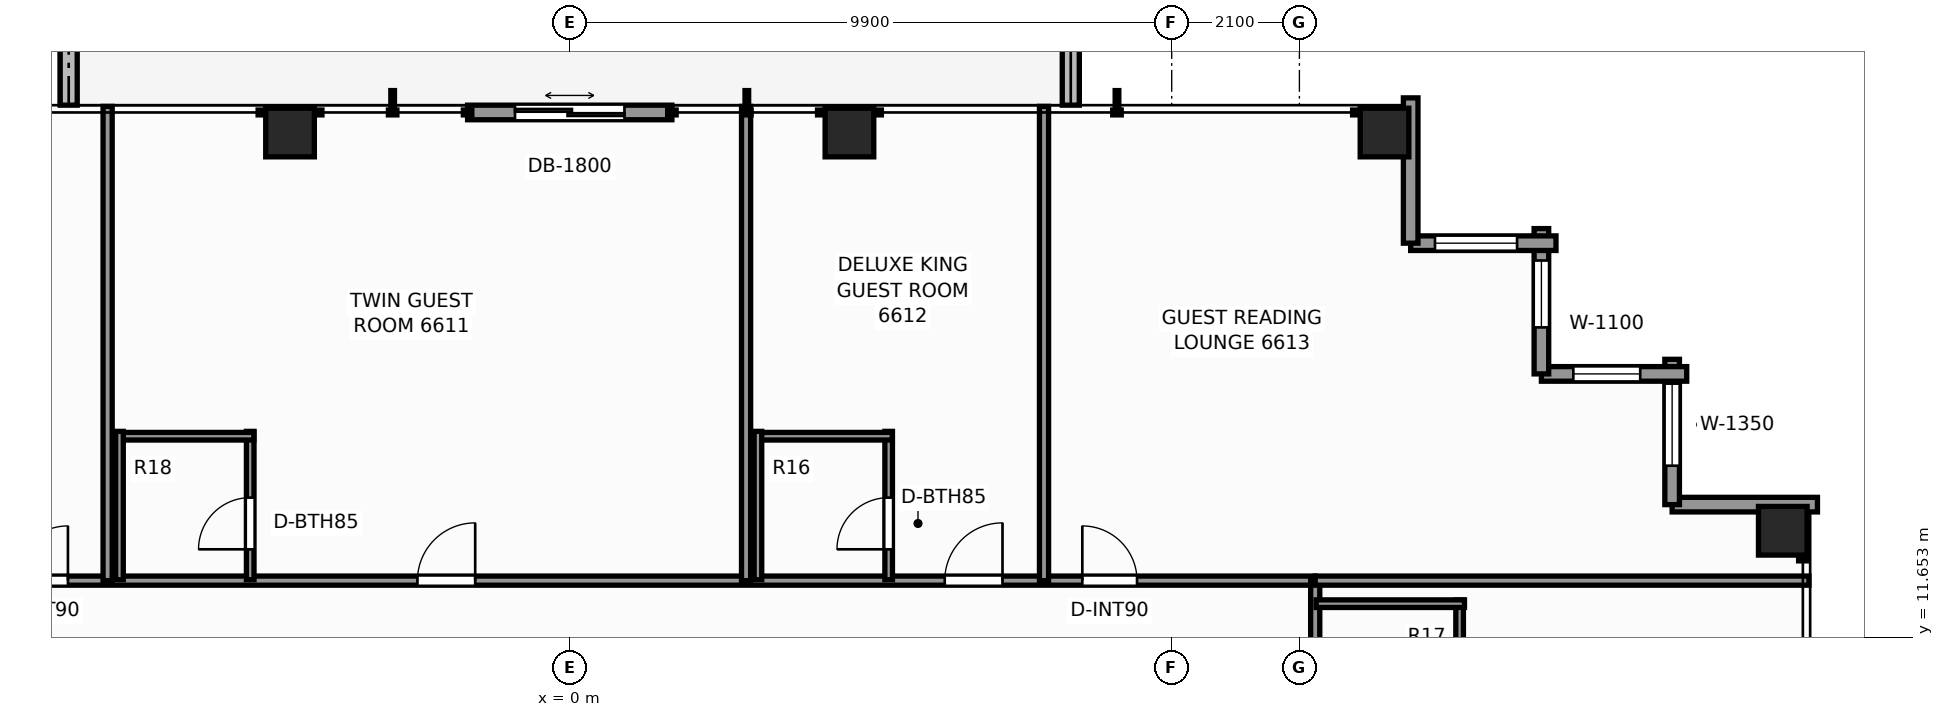
"""IFC4 building model, lengths in metres.
Left out: names, types, materials, properties, quantities, classifications, styles, units other than length and angle.
Written with IfcOpenShell. Run it as: python <this file> out.ifc"""

import sys

from ifc_helpers import new_model, si_unit, direction, frame, frame_2d, origin, origin_2d, place, context, subcontext, project, spatial, rectangle, extrude, element, fill, save


model = new_model("IFC4")
c1 = context("Model", 3, precision=1e-05, world=origin(), true_north=direction((0.0, 1.0)))
c2 = subcontext(c1, "Body", "Model", "MODEL_VIEW")
j1 = project(units=[si_unit("LENGTHUNIT", "METRE"), si_unit("PLANEANGLEUNIT", "RADIAN")], contexts=[c1])
p1 = place(None, origin())
s1 = spatial("IfcSite", under=j1, at=p1, CompositionType="ELEMENT")
p2 = place(p1, origin())
s2 = spatial("IfcBuilding", under=s1, at=p2, CompositionType="ELEMENT")
p3 = place(p2, frame((0.0, 0.0, 226.2)))
s3 = spatial("IfcBuildingStorey", under=s2, at=p3, CompositionType="ELEMENT", Elevation=226.2)
for number, where, z_axis, x_axis in (
    (1, (-4.6, 19.95, 0.0), (0.0, 0.0, 1.0), (1.0, 0.0, 0.0)),
    (2, (4.6, 19.95, 0.0), (0.0, 0.0, 1.0), (1.0, 0.0, 0.0)),
    (3, (13.4, 19.95, 0.0), (0.0, 0.0, 1.0), (1.0, 0.0, 0.0)),
    (4, (19.95, 13.4, 0.0), (0.0, 0.0, 1.0), (1.0, 0.0, 0.0)),
):
    element("IfcColumn", number, at=place(p3, frame(where, z_axis=z_axis, x_axis=x_axis)), inside=s3, PredefinedType="COLUMN", context=c2, shape_type="SweptSolid", body=[
        extrude(rectangle(XDim=0.8, YDim=0.8, at=origin_2d()), origin(), (0.0, 0.0, 1.0), 3.3),
    ])
p4 = place(p3, frame((8.24, 20.4, -0.04), z_axis=(0.0, 0.0, 1.0), x_axis=(0.0, 1.0, 0.0)))
e5 = element("IfcWall", 5, at=p4, inside=s3, PredefinedType="PARAPET", context=c2, shape_type="SweptSolid", body=[
    extrude(rectangle(XDim=2.34, YDim=0.28, at=frame_2d((1.17, 0.0))), origin(), (0.0, 0.0, 1.0), 0.42),
])
p5 = place(p3, frame((-8.24, 23.767, -0.04), z_axis=(0.0, 0.0, 1.0), x_axis=(0.0, -1.0, 0.0)))
e6 = element("IfcWall", 6, at=p5, inside=s3, PredefinedType="PARAPET", context=c2, shape_type="SweptSolid", body=[
    extrude(rectangle(XDim=3.367, YDim=0.28, at=frame_2d((1.684, 0.0))), origin(), (0.0, 0.0, 1.0), 0.42),
])
p6 = place(p3, frame((18.13, 13.83, 0.0), z_axis=(0.0, 0.0, 1.0), x_axis=(1.0, 0.0, 0.0)))
e7 = element("IfcWall", 7, at=p6, inside=s3, PredefinedType="STANDARD", context=c2, shape_type="SweptSolid", body=[
    extrude(rectangle(XDim=2.39, YDim=0.24, at=frame_2d((1.195, 0.0))), origin(), (0.0, 0.0, 1.0), 2.463),
])
p7 = place(p3, frame((18.13, 16.22, 0.0), z_axis=(0.0, 0.0, 1.0), x_axis=(0.0, -1.0, 0.0)))
e8 = element("IfcWall", 8, at=p7, inside=s3, PredefinedType="STANDARD", context=c2, shape_type="SweptSolid", body=[
    extrude(rectangle(XDim=2.39, YDim=0.24, at=frame_2d((1.195, 0.0))), origin(), (0.0, 0.0, 1.0), 2.463),
])
p8 = place(p7, frame((0.4, 0.0, 0.65)))
e9 = element("IfcOpeningElement", 9, at=p8, cuts=e8, PredefinedType="OPENING", context=c2, shape_type="SweptSolid", body=[
    extrude(rectangle(XDim=1.35, YDim=1.55, at=frame_2d((0.675, 0.775))), frame((0.0, 0.13, 0.0), z_axis=(0.0, -1.0, 0.0), x_axis=(1.0, 0.0, 0.0)), (0.0, 0.0, 1.0), 0.26),
])
p9 = place(p3, frame((15.98, 15.98, 0.0), z_axis=(0.0, 0.0, 1.0), x_axis=(1.0, 0.0, 0.0)))
e10 = element("IfcWall", 10, at=p9, inside=s3, PredefinedType="STANDARD", context=c2, shape_type="SweptSolid", body=[
    extrude(rectangle(XDim=2.39, YDim=0.24, at=frame_2d((1.195, 0.0))), origin(), (0.0, 0.0, 1.0), 2.463),
])
p10 = place(p9, frame((0.525, 0.0, 0.65)))
e11 = element("IfcOpeningElement", 11, at=p10, cuts=e10, PredefinedType="OPENING", context=c2, shape_type="SweptSolid", body=[
    extrude(rectangle(XDim=1.1, YDim=1.45, at=frame_2d((0.55, 0.725))), frame((0.0, 0.13, 0.0), z_axis=(0.0, -1.0, 0.0), x_axis=(1.0, 0.0, 0.0)), (0.0, 0.0, 1.0), 0.26),
])
p11 = place(p3, frame((15.98, 18.37, 0.0), z_axis=(0.0, 0.0, 1.0), x_axis=(0.0, -1.0, 0.0)))
e12 = element("IfcWall", 12, at=p11, inside=s3, PredefinedType="STANDARD", context=c2, shape_type="SweptSolid", body=[
    extrude(rectangle(XDim=2.39, YDim=0.24, at=frame_2d((1.195, 0.0))), origin(), (0.0, 0.0, 1.0), 2.463),
])
p12 = place(p11, frame((0.525, 0.0, 0.65)))
e13 = element("IfcOpeningElement", 13, at=p12, cuts=e12, PredefinedType="OPENING", context=c2, shape_type="SweptSolid", body=[
    extrude(rectangle(XDim=1.1, YDim=1.45, at=frame_2d((0.55, 0.725))), frame((0.0, 0.13, 0.0), z_axis=(0.0, -1.0, 0.0), x_axis=(1.0, 0.0, 0.0)), (0.0, 0.0, 1.0), 0.26),
])
p13 = place(p3, frame((13.83, 18.13, 0.0), z_axis=(0.0, 0.0, 1.0), x_axis=(1.0, 0.0, 0.0)))
e14 = element("IfcWall", 14, at=p13, inside=s3, PredefinedType="STANDARD", context=c2, shape_type="SweptSolid", body=[
    extrude(rectangle(XDim=2.39, YDim=0.24, at=frame_2d((1.195, 0.0))), origin(), (0.0, 0.0, 1.0), 2.463),
])
p14 = place(p13, frame((0.4, 0.0, 0.65)))
e15 = element("IfcOpeningElement", 15, at=p14, cuts=e14, PredefinedType="OPENING", context=c2, shape_type="SweptSolid", body=[
    extrude(rectangle(XDim=1.35, YDim=1.55, at=frame_2d((0.675, 0.775))), frame((0.0, 0.13, 0.0), z_axis=(0.0, -1.0, 0.0), x_axis=(1.0, 0.0, 0.0)), (0.0, 0.0, 1.0), 0.26),
])
p15 = place(p3, frame((13.83, 20.52, 0.0), z_axis=(0.0, 0.0, 1.0), x_axis=(0.0, -1.0, 0.0)))
e16 = element("IfcWall", 16, at=p15, inside=s3, PredefinedType="STANDARD", context=c2, shape_type="SweptSolid", body=[
    extrude(rectangle(XDim=2.39, YDim=0.24, at=frame_2d((1.195, 0.0))), origin(), (0.0, 0.0, 1.0), 2.463),
])
p16 = place(p3, frame((-1.68, 20.28, 0.0), z_axis=(0.0, 0.0, 1.0), x_axis=(1.0, 0.0, 0.0)))
e17 = element("IfcWall", 17, at=p16, inside=s3, PredefinedType="STANDARD", context=c2, shape_type="SweptSolid", body=[
    extrude(rectangle(XDim=3.36, YDim=0.24, at=frame_2d((1.68, 0.0))), origin(), (0.0, 0.0, 1.0), 3.08),
])
p17 = place(p16, frame((0.78, 0.0, 0.0)))
e18 = element("IfcOpeningElement", 18, at=p17, cuts=e17, PredefinedType="OPENING", context=c2, shape_type="SweptSolid", body=[
    extrude(rectangle(XDim=1.8, YDim=2.2, at=frame_2d((0.9, 1.1))), frame((0.0, 0.13, 0.0), z_axis=(0.0, -1.0, 0.0), x_axis=(1.0, 0.0, 0.0)), (0.0, 0.0, 1.0), 0.26),
])
p18 = place(p3, frame((-12.42, 12.58, 0.0), z_axis=(0.0, 0.0, 1.0), x_axis=(1.0, 0.0, 0.0)))
e19 = element("IfcWall", 19, at=p18, inside=s3, PredefinedType="PARTITIONING", context=c2, shape_type="SweptSolid", body=[
    extrude(rectangle(XDim=24.68, YDim=0.15, at=frame_2d((12.34, 0.0))), origin(), (0.0, 0.0, 1.0), 2.369),
])
p19 = place(p18, frame((3.267, 0.0, 0.0)))
e20 = element("IfcOpeningElement", 20, at=p19, cuts=e19, PredefinedType="OPENING", context=c2, shape_type="SweptSolid", body=[
    extrude(rectangle(XDim=0.9, YDim=2.06, at=frame_2d((0.45, 1.03))), frame((0.0, 0.085, 0.0), z_axis=(0.0, -1.0, 0.0), x_axis=(1.0, 0.0, 0.0)), (0.0, 0.0, 1.0), 0.17),
])
p20 = place(p18, frame((9.915, 0.0, 0.0)))
e21 = element("IfcOpeningElement", 21, at=p20, cuts=e19, PredefinedType="OPENING", context=c2, shape_type="SweptSolid", body=[
    extrude(rectangle(XDim=0.95, YDim=2.06, at=frame_2d((0.475, 1.03))), frame((0.0, 0.085, 0.0), z_axis=(0.0, -1.0, 0.0), x_axis=(1.0, 0.0, 0.0)), (0.0, 0.0, 1.0), 0.17),
])
p21 = place(p18, frame((18.587, 0.0, 0.0)))
e22 = element("IfcOpeningElement", 22, at=p21, cuts=e19, PredefinedType="OPENING", context=c2, shape_type="SweptSolid", body=[
    extrude(rectangle(XDim=0.95, YDim=2.06, at=frame_2d((0.475, 1.03))), frame((0.0, 0.085, 0.0), z_axis=(0.0, -1.0, 0.0), x_axis=(1.0, 0.0, 0.0)), (0.0, 0.0, 1.0), 0.17),
])
p22 = place(p18, frame((20.85, 0.0, 0.0)))
e23 = element("IfcOpeningElement", 23, at=p22, cuts=e19, PredefinedType="OPENING", context=c2, shape_type="SweptSolid", body=[
    extrude(rectangle(XDim=0.9, YDim=2.06, at=frame_2d((0.45, 1.03))), frame((0.0, 0.085, 0.0), z_axis=(0.0, -1.0, 0.0), x_axis=(1.0, 0.0, 0.0)), (0.0, 0.0, 1.0), 0.17),
])
p23 = place(p3, frame((12.26, -12.26, 0.0), z_axis=(0.0, 0.0, 1.0), x_axis=(0.0, 1.0, 0.0)))
e24 = element("IfcWall", 24, at=p23, inside=s3, PredefinedType="PARTITIONING", context=c2, shape_type="SweptSolid", body=[
    extrude(rectangle(XDim=24.84, YDim=0.15, at=frame_2d((12.42, 0.0))), origin(), (0.0, 0.0, 1.0), 2.369),
])
p24 = place(p23, frame((3.581, 0.0, 0.0)))
e25 = element("IfcOpeningElement", 25, at=p24, cuts=e24, PredefinedType="OPENING", context=c2, shape_type="SweptSolid", body=[
    extrude(rectangle(XDim=0.95, YDim=2.06, at=frame_2d((0.475, 1.03))), frame((0.0, 0.085, 0.0), z_axis=(0.0, -1.0, 0.0), x_axis=(1.0, 0.0, 0.0)), (0.0, 0.0, 1.0), 0.17),
])
p25 = place(p23, frame((9.755, 0.0, 0.0)))
e26 = element("IfcOpeningElement", 26, at=p25, cuts=e24, PredefinedType="OPENING", context=c2, shape_type="SweptSolid", body=[
    extrude(rectangle(XDim=0.95, YDim=2.06, at=frame_2d((0.475, 1.03))), frame((0.0, 0.085, 0.0), z_axis=(0.0, -1.0, 0.0), x_axis=(1.0, 0.0, 0.0)), (0.0, 0.0, 1.0), 0.17),
])
p26 = place(p23, frame((19.32, 0.0, 0.0)))
e27 = element("IfcOpeningElement", 27, at=p26, cuts=e24, PredefinedType="OPENING", context=c2, shape_type="SweptSolid", body=[
    extrude(rectangle(XDim=0.95, YDim=2.06, at=frame_2d((0.475, 1.03))), frame((0.0, 0.085, 0.0), z_axis=(0.0, -1.0, 0.0), x_axis=(1.0, 0.0, 0.0)), (0.0, 0.0, 1.0), 0.17),
])
p27 = place(p3, frame((12.26, 12.58, 0.0), z_axis=(0.0, 0.0, 1.0), x_axis=(1.0, 0.0, 0.0)))
e28 = element("IfcWall", 28, at=p27, inside=s3, PredefinedType="PARTITIONING", context=c2, shape_type="SweptSolid", body=[
    extrude(rectangle(XDim=8.12, YDim=0.15, at=frame_2d((4.06, 0.0))), origin(), (0.0, 0.0, 1.0), 2.369),
])
p28 = place(p3, frame((14.635, 9.991, 0.0), z_axis=(0.0, 0.0, 1.0), x_axis=(0.0, 1.0, 0.0)))
e29 = element("IfcWall", 29, at=p28, inside=s3, PredefinedType="PARTITIONING", context=c2, shape_type="SweptSolid", body=[
    extrude(rectangle(XDim=2.27, YDim=0.125, at=frame_2d((1.135, 0.0))), origin(), (0.0, 0.0, 1.0), 2.369),
])
p29 = place(p3, frame((12.275, 12.201, 0.0), z_axis=(0.0, 0.0, 1.0), x_axis=(1.0, 0.0, 0.0)))
e30 = element("IfcWall", 30, at=p29, inside=s3, PredefinedType="PARTITIONING", context=c2, shape_type="SweptSolid", body=[
    extrude(rectangle(XDim=2.44, YDim=0.125, at=frame_2d((1.22, 0.0))), origin(), (0.0, 0.0, 1.0), 3.08),
])
for number, where, z_axis, x_axis in (
    (31, (-7.6, 12.58, 0.0), (0.0, 0.0, 1.0), (0.0, 1.0, 0.0)),
    (32, (2.9, 12.58, 0.0), (0.0, 0.0, 1.0), (0.0, 1.0, 0.0)),
):
    element("IfcWall", number, at=place(p3, frame(where, z_axis=z_axis, x_axis=x_axis)), inside=s3, PredefinedType="PARTITIONING", context=c2, shape_type="SweptSolid", body=[
        extrude(rectangle(XDim=7.8, YDim=0.15, at=frame_2d((3.9, 0.0))), origin(), (0.0, 0.0, 1.0), 2.453),
    ])
p30 = place(p3, frame((-5.255, 12.595, 0.0), z_axis=(0.0, 0.0, 1.0), x_axis=(0.0, 1.0, 0.0)))
e33 = element("IfcWall", 33, at=p30, inside=s3, PredefinedType="PARTITIONING", context=c2, shape_type="SweptSolid", body=[
    extrude(rectangle(XDim=2.44, YDim=0.125, at=frame_2d((1.22, 0.0))), origin(), (0.0, 0.0, 1.0), 3.08),
])
p31 = place(p30, frame((0.5, 0.0, 0.0)))
e34 = element("IfcOpeningElement", 34, at=p31, cuts=e33, PredefinedType="OPENING", context=c2, shape_type="SweptSolid", body=[
    extrude(rectangle(XDim=0.85, YDim=2.03, at=frame_2d((0.425, 1.015))), frame((0.0, 0.073, 0.0), z_axis=(0.0, -1.0, 0.0), x_axis=(1.0, 0.0, 0.0)), (0.0, 0.0, 1.0), 0.145),
])
p32 = place(p3, frame((-7.465, 14.955, 0.0), z_axis=(0.0, 0.0, 1.0), x_axis=(1.0, 0.0, 0.0)))
e35 = element("IfcWall", 35, at=p32, inside=s3, PredefinedType="PARTITIONING", context=c2, shape_type="SweptSolid", body=[
    extrude(rectangle(XDim=2.27, YDim=0.125, at=frame_2d((1.135, 0.0))), origin(), (0.0, 0.0, 1.0), 3.08),
])
p33 = place(p3, frame((-7.405, 12.595, 0.0), z_axis=(0.0, 0.0, 1.0), x_axis=(0.0, 1.0, 0.0)))
e36 = element("IfcWall", 36, at=p33, inside=s3, PredefinedType="PARTITIONING", context=c2, shape_type="SweptSolid", body=[
    extrude(rectangle(XDim=2.44, YDim=0.125, at=frame_2d((1.22, 0.0))), origin(), (0.0, 0.0, 1.0), 3.08),
])
p34 = place(p3, frame((7.8, 12.58, 0.0), z_axis=(0.0, 0.0, 1.0), x_axis=(0.0, 1.0, 0.0)))
e37 = element("IfcWall", 37, at=p34, inside=s3, PredefinedType="PARTITIONING", context=c2, shape_type="SweptSolid", body=[
    extrude(rectangle(XDim=7.8, YDim=0.15, at=frame_2d((3.9, 0.0))), origin(), (0.0, 0.0, 1.0), 2.453),
])
p35 = place(p3, frame((5.245, 12.595, 0.0), z_axis=(0.0, 0.0, 1.0), x_axis=(0.0, 1.0, 0.0)))
e38 = element("IfcWall", 38, at=p35, inside=s3, PredefinedType="PARTITIONING", context=c2, shape_type="SweptSolid", body=[
    extrude(rectangle(XDim=2.44, YDim=0.125, at=frame_2d((1.22, 0.0))), origin(), (0.0, 0.0, 1.0), 3.08),
])
p36 = place(p35, frame((0.5, 0.0, 0.0)))
e39 = element("IfcOpeningElement", 39, at=p36, cuts=e38, PredefinedType="OPENING", context=c2, shape_type="SweptSolid", body=[
    extrude(rectangle(XDim=0.85, YDim=2.03, at=frame_2d((0.425, 1.015))), frame((0.0, 0.073, 0.0), z_axis=(0.0, -1.0, 0.0), x_axis=(1.0, 0.0, 0.0)), (0.0, 0.0, 1.0), 0.145),
])
p37 = place(p3, frame((3.035, 14.955, 0.0), z_axis=(0.0, 0.0, 1.0), x_axis=(1.0, 0.0, 0.0)))
e40 = element("IfcWall", 40, at=p37, inside=s3, PredefinedType="PARTITIONING", context=c2, shape_type="SweptSolid", body=[
    extrude(rectangle(XDim=2.27, YDim=0.125, at=frame_2d((1.135, 0.0))), origin(), (0.0, 0.0, 1.0), 2.369),
])
p38 = place(p3, frame((3.095, 12.595, 0.0), z_axis=(0.0, 0.0, 1.0), x_axis=(0.0, 1.0, 0.0)))
e41 = element("IfcWall", 41, at=p38, inside=s3, PredefinedType="PARTITIONING", context=c2, shape_type="SweptSolid", body=[
    extrude(rectangle(XDim=2.44, YDim=0.125, at=frame_2d((1.22, 0.0))), origin(), (0.0, 0.0, 1.0), 3.08),
])
p39 = place(p8, origin())
e42 = element("IfcWindow", 42, at=p39, inside=s3, PartitioningType="SINGLE_PANEL", PredefinedType="WINDOW", context=c2, shape_type="SweptSolid", body=[
    extrude(rectangle(XDim=1.35, YDim=1.55, at=frame_2d((0.675, 0.775))), frame((0.0, 0.03, 0.0), z_axis=(0.0, -1.0, 0.0), x_axis=(1.0, 0.0, 0.0)), (0.0, 0.0, 1.0), 0.06),
])
fill(e9, e42)
p40 = place(p10, origin())
e43 = element("IfcWindow", 43, at=p40, inside=s3, PartitioningType="SINGLE_PANEL", PredefinedType="WINDOW", context=c2, shape_type="SweptSolid", body=[
    extrude(rectangle(XDim=1.1, YDim=1.45, at=frame_2d((0.55, 0.725))), frame((0.0, 0.03, 0.0), z_axis=(0.0, -1.0, 0.0), x_axis=(1.0, 0.0, 0.0)), (0.0, 0.0, 1.0), 0.06),
])
fill(e11, e43)
p41 = place(p12, origin())
e44 = element("IfcWindow", 44, at=p41, inside=s3, PartitioningType="SINGLE_PANEL", PredefinedType="WINDOW", context=c2, shape_type="SweptSolid", body=[
    extrude(rectangle(XDim=1.1, YDim=1.45, at=frame_2d((0.55, 0.725))), frame((0.0, 0.03, 0.0), z_axis=(0.0, -1.0, 0.0), x_axis=(1.0, 0.0, 0.0)), (0.0, 0.0, 1.0), 0.06),
])
fill(e13, e44)
p42 = place(p14, origin())
e45 = element("IfcWindow", 45, at=p42, inside=s3, PartitioningType="SINGLE_PANEL", PredefinedType="WINDOW", context=c2, shape_type="SweptSolid", body=[
    extrude(rectangle(XDim=1.35, YDim=1.55, at=frame_2d((0.675, 0.775))), frame((0.0, 0.03, 0.0), z_axis=(0.0, -1.0, 0.0), x_axis=(1.0, 0.0, 0.0)), (0.0, 0.0, 1.0), 0.06),
])
fill(e15, e45)
p43 = place(p17, origin())
e46 = element("IfcDoor", 46, at=p43, inside=s3, OperationType="DOUBLE_DOOR_SLIDING", PredefinedType="DOOR", context=c2, shape_type="SweptSolid", body=[
    extrude(rectangle(XDim=1.8, YDim=2.2, at=frame_2d((0.9, 1.1))), frame((0.0, 0.025, 0.0), z_axis=(0.0, -1.0, 0.0), x_axis=(1.0, 0.0, 0.0)), (0.0, 0.0, 1.0), 0.05),
])
fill(e18, e46)
p44 = place(p19, origin())
e47 = element("IfcDoor", 47, at=p44, inside=s3, OperationType="SINGLE_SWING_RIGHT", PredefinedType="DOOR", context=c2, shape_type="SweptSolid", body=[
    extrude(rectangle(XDim=0.9, YDim=2.06, at=frame_2d((0.45, 1.03))), frame((0.0, 0.025, 0.0), z_axis=(0.0, -1.0, 0.0), x_axis=(1.0, 0.0, 0.0)), (0.0, 0.0, 1.0), 0.05),
])
fill(e20, e47)
p45 = place(p31, origin())
e48 = element("IfcDoor", 48, at=p45, inside=s3, OperationType="SINGLE_SWING_LEFT", PredefinedType="DOOR", context=c2, shape_type="SweptSolid", body=[
    extrude(rectangle(XDim=0.85, YDim=2.03, at=frame_2d((0.425, 1.015))), frame((0.0, 0.025, 0.0), z_axis=(0.0, -1.0, 0.0), x_axis=(1.0, 0.0, 0.0)), (0.0, 0.0, 1.0), 0.05),
])
fill(e34, e48)
p46 = place(p20, origin())
e49 = element("IfcDoor", 49, at=p46, inside=s3, OperationType="SINGLE_SWING_RIGHT", PredefinedType="DOOR", context=c2, shape_type="SweptSolid", body=[
    extrude(rectangle(XDim=0.95, YDim=2.06, at=frame_2d((0.475, 1.03))), frame((0.0, 0.025, 0.0), z_axis=(0.0, -1.0, 0.0), x_axis=(1.0, 0.0, 0.0)), (0.0, 0.0, 1.0), 0.05),
])
fill(e21, e49)
p47 = place(p36, origin())
e50 = element("IfcDoor", 50, at=p47, inside=s3, OperationType="SINGLE_SWING_LEFT", PredefinedType="DOOR", context=c2, shape_type="SweptSolid", body=[
    extrude(rectangle(XDim=0.85, YDim=2.03, at=frame_2d((0.425, 1.015))), frame((0.0, 0.025, 0.0), z_axis=(0.0, -1.0, 0.0), x_axis=(1.0, 0.0, 0.0)), (0.0, 0.0, 1.0), 0.05),
])
fill(e39, e50)
p48 = place(p21, origin())
e51 = element("IfcDoor", 51, at=p48, inside=s3, OperationType="SINGLE_SWING_RIGHT", PredefinedType="DOOR", context=c2, shape_type="SweptSolid", body=[
    extrude(rectangle(XDim=0.95, YDim=2.06, at=frame_2d((0.475, 1.03))), frame((0.0, 0.025, 0.0), z_axis=(0.0, -1.0, 0.0), x_axis=(1.0, 0.0, 0.0)), (0.0, 0.0, 1.0), 0.05),
])
fill(e22, e51)
p49 = place(p22, origin())
e52 = element("IfcDoor", 52, at=p49, inside=s3, OperationType="SINGLE_SWING_LEFT", PredefinedType="DOOR", context=c2, shape_type="SweptSolid", body=[
    extrude(rectangle(XDim=0.9, YDim=2.06, at=frame_2d((0.45, 1.03))), frame((0.0, 0.025, 0.0), z_axis=(0.0, -1.0, 0.0), x_axis=(1.0, 0.0, 0.0)), (0.0, 0.0, 1.0), 0.05),
])
fill(e23, e52)
save(model, sys.argv[1])
